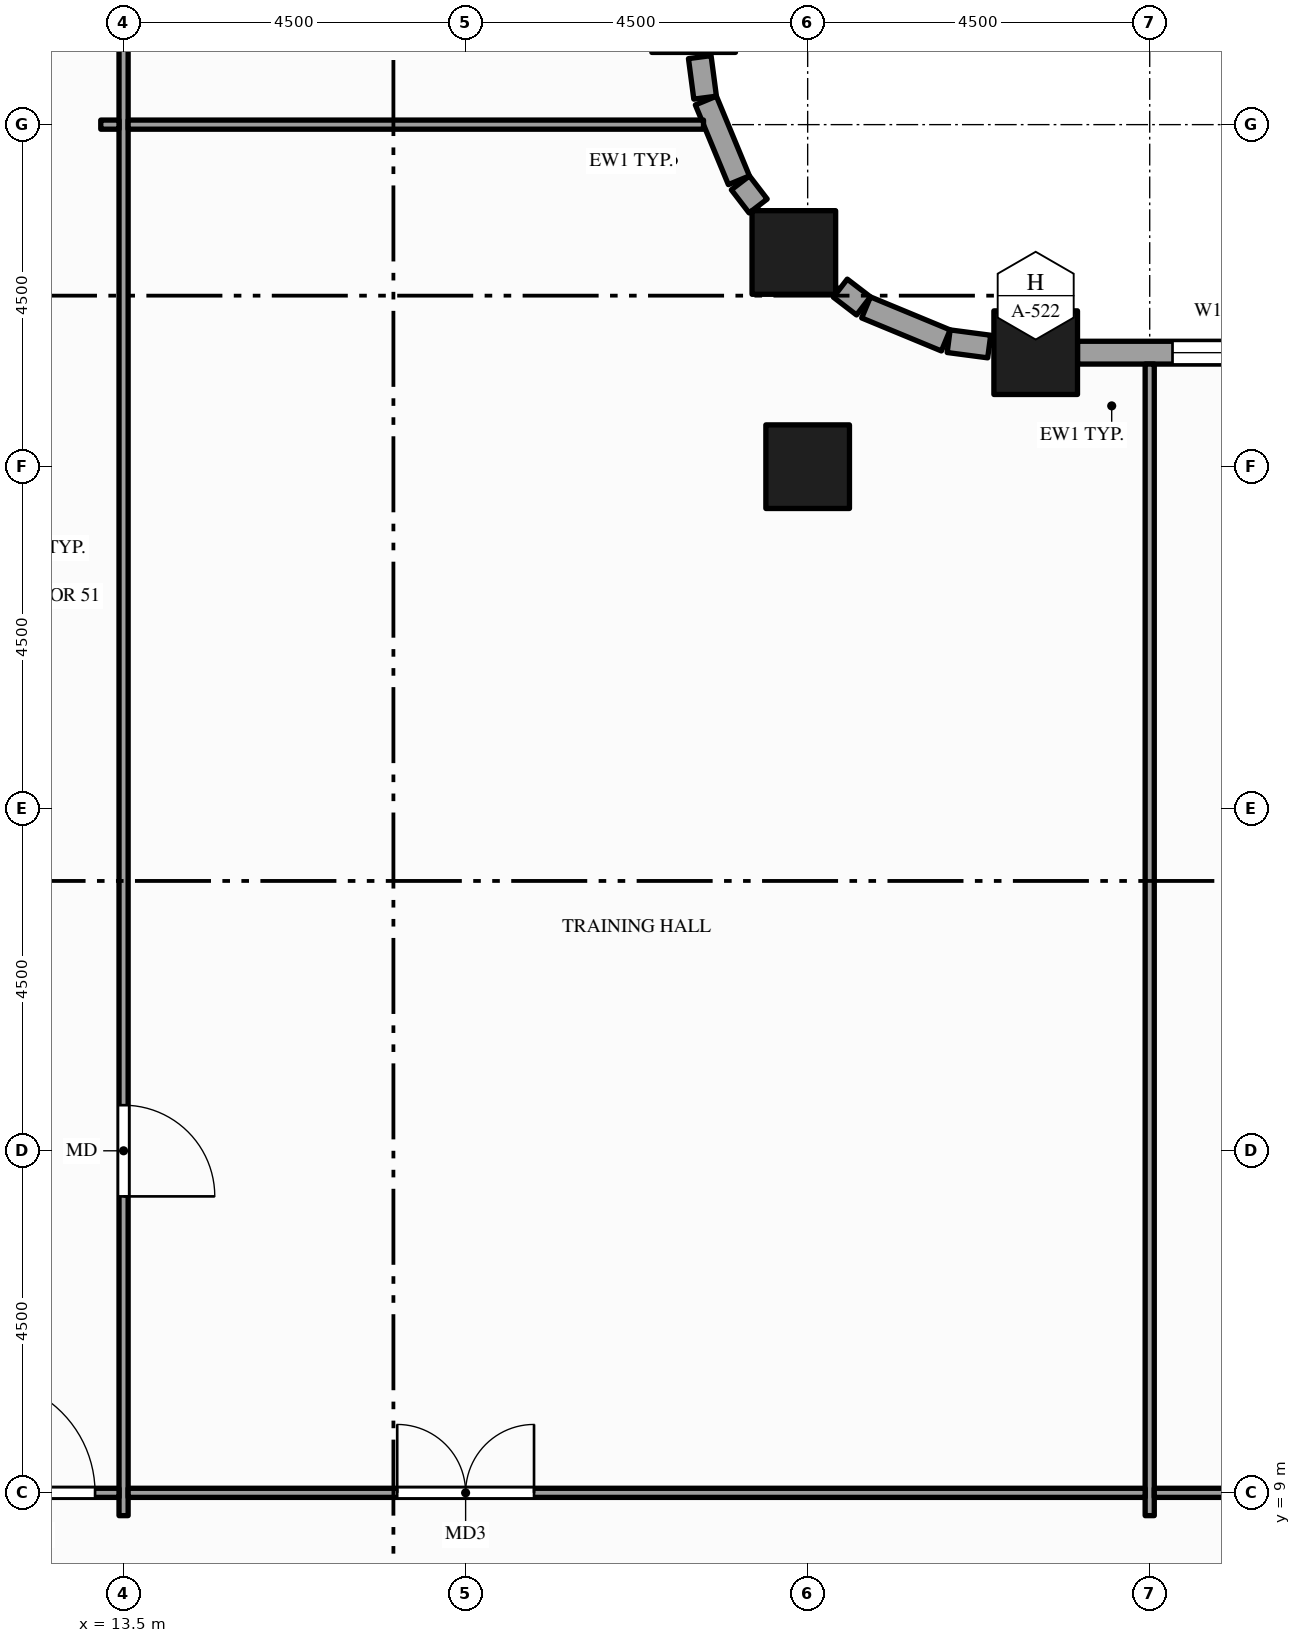
"""IFC4 building model, lengths in metres.
Left out: names, types, materials, properties, quantities, classifications, styles, units other than length and angle.
Written with IfcOpenShell. Run it as: python <this file> out.ifc"""

import sys

from ifc_helpers import new_model, si_unit, direction, frame, frame_2d, origin, origin_2d, place, context, subcontext, project, spatial, rectangle, hollow_rectangle, extrude, element, fill, save


model = new_model("IFC4")
c1 = context("Model", 3, precision=1e-05, world=origin(), true_north=direction((0.0, 1.0)))
c2 = subcontext(c1, "Body", "Model", "MODEL_VIEW")
j1 = project(units=[si_unit("LENGTHUNIT", "METRE"), si_unit("PLANEANGLEUNIT", "RADIAN")], contexts=[c1])
p1 = place(None, origin())
s1 = spatial("IfcSite", under=j1, at=p1, CompositionType="ELEMENT")
p2 = place(p1, origin())
s2 = spatial("IfcBuilding", under=s1, at=p2, CompositionType="ELEMENT")
p3 = place(p2, frame((0.0, 0.0, 49.0)))
s3 = spatial("IfcBuildingStorey", under=s2, at=p3, CompositionType="ELEMENT", Elevation=49.0)
for number, where, z_axis, x_axis in (
    (1, (22.318, 25.318, -0.15), (0.0, 0.0, 1.0), (1.0, 0.0, 0.0)),
    (2, (22.5, 22.5, -0.15), (0.0, 0.0, 1.0), (1.0, 0.0, 0.0)),
    (3, (25.5, 24.0, -0.15), (0.0, 0.0, 1.0), (1.0, 0.0, 0.0)),
):
    element("IfcColumn", number, at=place(p3, frame(where, z_axis=z_axis, x_axis=x_axis)), inside=s3, PredefinedType="COLUMN", context=c2, shape_type="SweptSolid", body=[
        extrude(hollow_rectangle(XDim=1.1, YDim=1.1, WallThickness=0.06, at=origin_2d()), origin(), (0.0, 0.0, 1.0), 4.0),
    ])
p4 = place(p3, frame((30.95, 24.0, 0.0), z_axis=(0.0, 0.0, 1.0), x_axis=(-1.0, 0.0, 0.0)))
e4 = element("IfcWall", 4, at=p4, inside=s3, PredefinedType="STANDARD", context=c2, shape_type="SweptSolid", body=[
    extrude(rectangle(XDim=4.9, YDim=0.3, at=frame_2d((2.45, 0.0))), origin(), (0.0, 0.0, 1.0), 3.144),
])
p5 = place(p4, frame((0.4, 0.0, 0.9)))
e5 = element("IfcOpeningElement", 5, at=p5, cuts=e4, PredefinedType="OPENING", context=c2, shape_type="SweptSolid", body=[
    extrude(rectangle(XDim=1.0, YDim=2.0, at=frame_2d((0.5, 1.0))), frame((0.0, 0.16, 0.0), z_axis=(0.0, -1.0, 0.0), x_axis=(1.0, 0.0, 0.0)), (0.0, 0.0, 1.0), 0.32),
])
p6 = place(p4, frame((2.0, 0.0, 0.9)))
e6 = element("IfcOpeningElement", 6, at=p6, cuts=e4, PredefinedType="OPENING", context=c2, shape_type="SweptSolid", body=[
    extrude(rectangle(XDim=1.65, YDim=2.0, at=frame_2d((0.825, 1.0))), frame((0.0, 0.16, 0.0), z_axis=(0.0, -1.0, 0.0), x_axis=(1.0, 0.0, 0.0)), (0.0, 0.0, 1.0), 0.32),
])
p7 = place(p3, frame((24.888, 24.081, 0.0), z_axis=(0.0, 0.0, 1.0), x_axis=(-0.991417173479, 0.130736330569, 0.0)))
e7 = element("IfcWall", 7, at=p7, inside=s3, PredefinedType="STANDARD", context=c2, shape_type="SweptSolid", body=[
    extrude(rectangle(XDim=0.538, YDim=0.3, at=frame_2d((0.269, 0.0))), origin(), (0.0, 0.0, 1.0), 2.938),
])
p8 = place(p3, frame((24.317, 24.161, 0.0), z_axis=(0.0, 0.0, 1.0), x_axis=(-0.923914616768, 0.382598720491, 0.0)))
e8 = element("IfcWall", 8, at=p8, inside=s3, PredefinedType="STANDARD", context=c2, shape_type="SweptSolid", body=[
    extrude(rectangle(XDim=1.135, YDim=0.3, at=frame_2d((0.568, 0.0))), origin(), (0.0, 0.0, 1.0), 3.144),
])
for number, where, z_axis, x_axis in (
    (9, (23.234, 24.615, 0.0), (0.0, 0.0, 1.0), (-0.794, 0.609, 0.0)),
    (10, (21.849, 25.93, 0.0), (0.0, 0.0, 1.0), (-0.609, 0.794, 0.0)),
):
    element("IfcWall", number, at=place(p3, frame(where, z_axis=z_axis, x_axis=x_axis)), inside=s3, PredefinedType="STANDARD", context=c2, shape_type="SweptSolid", body=[
        extrude(rectangle(XDim=0.384, YDim=0.3, at=frame_2d((0.192, 0.0))), origin(), (0.0, 0.0, 1.0), 3.144),
    ])
p9 = place(p3, frame((21.595, 26.268, 0.0), z_axis=(0.0, 0.0, 1.0), x_axis=(-0.382598720491, 0.923914616768, 0.0)))
e11 = element("IfcWall", 11, at=p9, inside=s3, PredefinedType="STANDARD", context=c2, shape_type="SweptSolid", body=[
    extrude(rectangle(XDim=1.135, YDim=0.3, at=frame_2d((0.568, 0.0))), origin(), (0.0, 0.0, 1.0), 3.144),
])
p10 = place(p3, frame((21.151, 27.355, 0.0), z_axis=(0.0, 0.0, 1.0), x_axis=(-0.130736330569, 0.991417173479, 0.0)))
e12 = element("IfcWall", 12, at=p10, inside=s3, PredefinedType="STANDARD", context=c2, shape_type="SweptSolid", body=[
    extrude(rectangle(XDim=0.538, YDim=0.3, at=frame_2d((0.269, 0.0))), origin(), (0.0, 0.0, 1.0), 3.144),
])
p11 = place(p3, frame((13.5, 8.7, 0.0), z_axis=(0.0, 0.0, 1.0), x_axis=(0.0, 1.0, 0.0)))
e13 = element("IfcWall", 13, at=p11, inside=s3, PredefinedType="PARTITIONING", context=c2, shape_type="SweptSolid", body=[
    extrude(rectangle(XDim=23.1, YDim=0.12, at=frame_2d((11.55, 0.0))), origin(), (0.0, 0.0, 1.0), 2.6),
])
p12 = place(p11, frame((20.05, 0.0, 0.0)))
e14 = element("IfcOpeningElement", 14, at=p12, cuts=e13, PredefinedType="OPENING", context=c2, shape_type="SweptSolid", body=[
    extrude(rectangle(XDim=1.0, YDim=2.1, at=frame_2d((0.5, 1.05))), frame((0.0, 0.07, 0.0), z_axis=(0.0, -1.0, 0.0), x_axis=(1.0, 0.0, 0.0)), (0.0, 0.0, 1.0), 0.14),
])
p13 = place(p11, frame((4.2, 0.0, 0.0)))
e15 = element("IfcOpeningElement", 15, at=p13, cuts=e13, PredefinedType="OPENING", context=c2, shape_type="SweptSolid", body=[
    extrude(rectangle(XDim=1.2, YDim=2.1, at=frame_2d((0.6, 1.05))), frame((0.0, 0.07, 0.0), z_axis=(0.0, -1.0, 0.0), x_axis=(1.0, 0.0, 0.0)), (0.0, 0.0, 1.0), 0.14),
])
p14 = place(p3, frame((27.0, 8.7, 0.0), z_axis=(0.0, 0.0, 1.0), x_axis=(0.0, 1.0, 0.0)))
e16 = element("IfcWall", 16, at=p14, inside=s3, PredefinedType="PARTITIONING", context=c2, shape_type="SweptSolid", body=[
    extrude(rectangle(XDim=15.15, YDim=0.12, at=frame_2d((7.575, 0.0))), origin(), (0.0, 0.0, 1.0), 2.938),
])
p15 = place(p3, frame((11.31, 9.0, 0.0), z_axis=(0.0, 0.0, 1.0), x_axis=(1.0, 0.0, 0.0)))
e17 = element("IfcWall", 17, at=p15, inside=s3, PredefinedType="PARTITIONING", context=c2, shape_type="SweptSolid", body=[
    extrude(rectangle(XDim=2.13, YDim=0.12, at=frame_2d((1.065, 0.0))), origin(), (0.0, 0.0, 1.0), 2.938),
])
p16 = place(p15, frame((0.315, 0.0, 0.0)))
e18 = element("IfcOpeningElement", 18, at=p16, cuts=e17, PredefinedType="OPENING", context=c2, shape_type="SweptSolid", body=[
    extrude(rectangle(XDim=1.5, YDim=2.1, at=frame_2d((0.75, 1.05))), frame((0.0, 0.07, 0.0), z_axis=(0.0, -1.0, 0.0), x_axis=(1.0, 0.0, 0.0)), (0.0, 0.0, 1.0), 0.14),
])
p17 = place(p3, frame((13.56, 9.0, 0.0), z_axis=(0.0, 0.0, 1.0), x_axis=(1.0, 0.0, 0.0)))
e19 = element("IfcWall", 19, at=p17, inside=s3, PredefinedType="PARTITIONING", context=c2, shape_type="SweptSolid", body=[
    extrude(rectangle(XDim=13.38, YDim=0.12, at=frame_2d((6.69, 0.0))), origin(), (0.0, 0.0, 1.0), 2.938),
])
p18 = place(p17, frame((3.54, 0.0, 0.0)))
e20 = element("IfcOpeningElement", 20, at=p18, cuts=e19, PredefinedType="OPENING", context=c2, shape_type="SweptSolid", body=[
    extrude(rectangle(XDim=1.8, YDim=2.1, at=frame_2d((0.9, 1.05))), frame((0.0, 0.07, 0.0), z_axis=(0.0, -1.0, 0.0), x_axis=(1.0, 0.0, 0.0)), (0.0, 0.0, 1.0), 0.14),
])
p19 = place(p3, frame((27.06, 9.0, 0.0), z_axis=(0.0, 0.0, 1.0), x_axis=(1.0, 0.0, 0.0)))
e21 = element("IfcWall", 21, at=p19, inside=s3, PredefinedType="PARTITIONING", context=c2, shape_type="SweptSolid", body=[
    extrude(rectangle(XDim=11.13, YDim=0.12, at=frame_2d((5.565, 0.0))), origin(), (0.0, 0.0, 1.0), 2.938),
])
p20 = place(p19, frame((4.665, 0.0, 0.0)))
e22 = element("IfcOpeningElement", 22, at=p20, cuts=e21, PredefinedType="OPENING", context=c2, shape_type="SweptSolid", body=[
    extrude(rectangle(XDim=1.8, YDim=2.1, at=frame_2d((0.9, 1.05))), frame((0.0, 0.07, 0.0), z_axis=(0.0, -1.0, 0.0), x_axis=(1.0, 0.0, 0.0)), (0.0, 0.0, 1.0), 0.14),
])
p21 = place(p3, frame((13.2, 27.0, 0.0), z_axis=(0.0, 0.0, 1.0), x_axis=(1.0, 0.0, 0.0)))
e23 = element("IfcWall", 23, at=p21, inside=s3, PredefinedType="PARTITIONING", context=c2, shape_type="SweptSolid", body=[
    extrude(rectangle(XDim=0.24, YDim=0.12, at=frame_2d((0.12, 0.0))), origin(), (0.0, 0.0, 1.0), 2.938),
])
p22 = place(p3, frame((13.56, 27.0, 0.0), z_axis=(0.0, 0.0, 1.0), x_axis=(1.0, 0.0, 0.0)))
e24 = element("IfcWall", 24, at=p22, inside=s3, PredefinedType="PARTITIONING", context=c2, shape_type="SweptSolid", body=[
    extrude(rectangle(XDim=7.57, YDim=0.12, at=frame_2d((3.785, 0.0))), origin(), (0.0, 0.0, 1.0), 2.938),
])
p23 = place(p6, origin())
e25 = element("IfcWindow", 25, at=p23, inside=s3, PartitioningType="SINGLE_PANEL", PredefinedType="WINDOW", context=c2, shape_type="SweptSolid", body=[
    extrude(rectangle(XDim=1.65, YDim=2.0, at=frame_2d((0.825, 1.0))), frame((0.0, 0.03, 0.0), z_axis=(0.0, -1.0, 0.0), x_axis=(1.0, 0.0, 0.0)), (0.0, 0.0, 1.0), 0.06),
])
fill(e6, e25)
p24 = place(p18, origin())
e26 = element("IfcDoor", 26, at=p24, inside=s3, OperationType="DOUBLE_DOOR_SINGLE_SWING", PredefinedType="DOOR", context=c2, shape_type="SweptSolid", body=[
    extrude(rectangle(XDim=1.8, YDim=2.1, at=frame_2d((0.9, 1.05))), frame((0.0, 0.025, 0.0), z_axis=(0.0, -1.0, 0.0), x_axis=(1.0, 0.0, 0.0)), (0.0, 0.0, 1.0), 0.05),
])
fill(e20, e26)
p25 = place(p16, origin())
e27 = element("IfcDoor", 27, at=p25, inside=s3, OperationType="SINGLE_SWING_LEFT", PredefinedType="DOOR", context=c2, shape_type="SweptSolid", body=[
    extrude(rectangle(XDim=1.5, YDim=2.1, at=frame_2d((0.75, 1.05))), frame((0.0, 0.025, 0.0), z_axis=(0.0, -1.0, 0.0), x_axis=(1.0, 0.0, 0.0)), (0.0, 0.0, 1.0), 0.05),
])
fill(e18, e27)
p26 = place(p13, origin())
e28 = element("IfcDoor", 28, at=p26, inside=s3, OperationType="SINGLE_SWING_LEFT", PredefinedType="DOOR", context=c2, shape_type="SweptSolid", body=[
    extrude(rectangle(XDim=1.2, YDim=2.1, at=frame_2d((0.6, 1.05))), frame((0.0, 0.025, 0.0), z_axis=(0.0, -1.0, 0.0), x_axis=(1.0, 0.0, 0.0)), (0.0, 0.0, 1.0), 0.05),
])
fill(e15, e28)
save(model, sys.argv[1])
